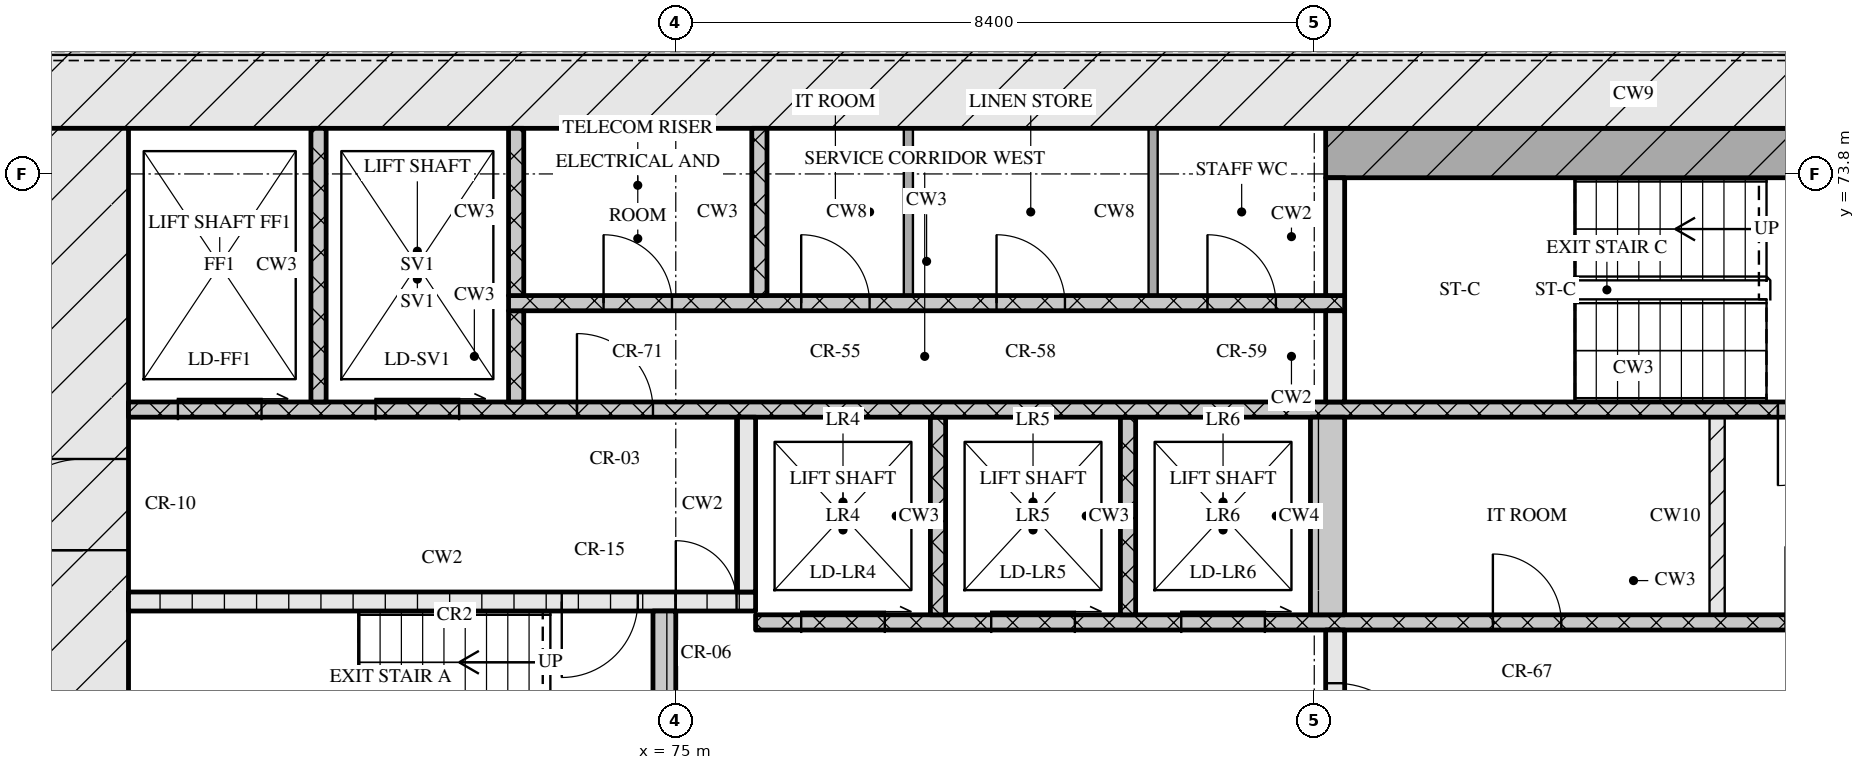
"""IFC4 building model, lengths in metres.
Left out: names, types, materials, properties, quantities, classifications, styles, units other than length and angle.
Written with IfcOpenShell. Run it as: python <this file> out.ifc"""

import sys

from ifc_helpers import new_model, si_unit, direction, frame, frame_2d, origin, place, context, subcontext, project, spatial, rectangle, extrude, element, fill, save


model = new_model("IFC4")
c1 = context("Model", 3, precision=1e-05, world=origin(), true_north=direction((0.0, 1.0)))
c2 = subcontext(c1, "Body", "Model", "MODEL_VIEW")
j1 = project(units=[si_unit("LENGTHUNIT", "METRE"), si_unit("PLANEANGLEUNIT", "RADIAN")], contexts=[c1])
p1 = place(None, origin())
s1 = spatial("IfcSite", under=j1, at=p1, CompositionType="ELEMENT")
p2 = place(p1, origin())
s2 = spatial("IfcBuilding", under=s1, at=p2, CompositionType="ELEMENT")
p3 = place(p2, frame((0.0, 0.0, 80.4)))
s3 = spatial("IfcBuildingStorey", under=s2, at=p3, CompositionType="ELEMENT", Elevation=80.4)
p4 = place(p3, frame((66.6, 75.0, 0.0), z_axis=(0.0, 0.0, 1.0), x_axis=(1.0, 0.0, 0.0)))
e1 = element("IfcWall", 1, at=p4, inside=s3, PredefinedType="SOLIDWALL", context=c2, shape_type="SweptSolid", body=[
    extrude(rectangle(XDim=42.0, YDim=1.2, at=frame_2d((21.0, 0.0))), origin(), (0.0, 0.0, 1.0), 3.3),
])
p5 = place(p3, frame((67.2, 62.4, 0.0), z_axis=(0.0, 0.0, 1.0), x_axis=(0.0, 1.0, 0.0)))
e2 = element("IfcWall", 2, at=p5, inside=s3, PredefinedType="SOLIDWALL", context=c2, shape_type="SweptSolid", body=[
    extrude(rectangle(XDim=12.0, YDim=1.2, at=frame_2d((6.0, 0.0))), origin(), (0.0, 0.0, 1.0), 3.3),
])
p6 = place(p5, frame((6.45, 0.0, 0.0)))
e3 = element("IfcOpeningElement", 3, at=p6, cuts=e2, PredefinedType="OPENING", context=c2, shape_type="SweptSolid", body=[
    extrude(rectangle(XDim=1.2, YDim=2.1, at=frame_2d((0.6, 1.05))), frame((0.0, 0.61, 0.0), z_axis=(0.0, -1.0, 0.0), x_axis=(1.0, 0.0, 0.0)), (0.0, 0.0, 1.0), 1.22),
])
p7 = place(p3, frame((74.85, 65.2, 0.0), z_axis=(0.0, 0.0, 1.0), x_axis=(0.0, 1.0, 0.0)))
e4 = element("IfcWall", 4, at=p7, inside=s3, PredefinedType="SOLIDWALL", context=c2, shape_type="SweptSolid", body=[
    extrude(rectangle(XDim=2.85, YDim=0.3, at=frame_2d((1.425, 0.0))), origin(), (0.0, 0.0, 1.0), 3.3),
])
p8 = place(p3, frame((83.675, 65.2, 0.0), z_axis=(0.0, 0.0, 1.0), x_axis=(0.0, 1.0, 0.0)))
e5 = element("IfcWall", 5, at=p8, inside=s3, PredefinedType="SOLIDWALL", context=c2, shape_type="SweptSolid", body=[
    extrude(rectangle(XDim=2.6, YDim=0.25, at=frame_2d((1.3, 0.0))), origin(), (0.0, 0.0, 1.0), 3.3),
])
p9 = place(p8, frame((0.7, 0.0, 0.0)))
e6 = element("IfcOpeningElement", 6, at=p9, cuts=e5, PredefinedType="OPENING", context=c2, shape_type="SweptSolid", body=[
    extrude(rectangle(XDim=1.2, YDim=2.1, at=frame_2d((0.6, 1.05))), frame((0.0, 0.135, 0.0), z_axis=(0.0, -1.0, 0.0), x_axis=(1.0, 0.0, 0.0)), (0.0, 0.0, 1.0), 0.27),
])
p10 = place(p3, frame((76.05, 67.9, 0.0), z_axis=(0.0, 0.0, 1.0), x_axis=(1.0, 0.0, 0.0)))
e7 = element("IfcWall", 7, at=p10, inside=s3, PredefinedType="SOLIDWALL", context=c2, shape_type="SweptSolid", body=[
    extrude(rectangle(XDim=23.1, YDim=0.2, at=frame_2d((11.55, 0.0))), origin(), (0.0, 0.0, 1.0), 3.3),
])
p11 = place(p10, frame((0.6, 0.0, 0.0)))
e8 = element("IfcOpeningElement", 8, at=p11, cuts=e7, PredefinedType="OPENING", context=c2, shape_type="SweptSolid", body=[
    extrude(rectangle(XDim=1.1, YDim=2.1, at=frame_2d((0.55, 1.05))), frame((0.0, 0.11, 0.0), z_axis=(0.0, -1.0, 0.0), x_axis=(1.0, 0.0, 0.0)), (0.0, 0.0, 1.0), 0.22),
])
p12 = place(p10, frame((3.1, 0.0, 0.0)))
e9 = element("IfcOpeningElement", 9, at=p12, cuts=e7, PredefinedType="OPENING", context=c2, shape_type="SweptSolid", body=[
    extrude(rectangle(XDim=1.1, YDim=2.1, at=frame_2d((0.55, 1.05))), frame((0.0, 0.11, 0.0), z_axis=(0.0, -1.0, 0.0), x_axis=(1.0, 0.0, 0.0)), (0.0, 0.0, 1.0), 0.22),
])
p13 = place(p10, frame((5.6, 0.0, 0.0)))
e10 = element("IfcOpeningElement", 10, at=p13, cuts=e7, PredefinedType="OPENING", context=c2, shape_type="SweptSolid", body=[
    extrude(rectangle(XDim=1.1, YDim=2.1, at=frame_2d((0.55, 1.05))), frame((0.0, 0.11, 0.0), z_axis=(0.0, -1.0, 0.0), x_axis=(1.0, 0.0, 0.0)), (0.0, 0.0, 1.0), 0.22),
])
p14 = place(p10, frame((9.7, 0.0, 0.0)))
e11 = element("IfcOpeningElement", 11, at=p14, cuts=e7, PredefinedType="OPENING", context=c2, shape_type="SweptSolid", body=[
    extrude(rectangle(XDim=0.9, YDim=2.1, at=frame_2d((0.45, 1.05))), frame((0.0, 0.11, 0.0), z_axis=(0.0, -1.0, 0.0), x_axis=(1.0, 0.0, 0.0)), (0.0, 0.0, 1.0), 0.22),
])
p15 = place(p10, frame((13.55, 0.0, 0.0)))
e12 = element("IfcOpeningElement", 12, at=p15, cuts=e7, PredefinedType="OPENING", context=c2, shape_type="SweptSolid", body=[
    extrude(rectangle(XDim=1.0, YDim=2.1, at=frame_2d((0.5, 1.05))), frame((0.0, 0.11, 0.0), z_axis=(0.0, -1.0, 0.0), x_axis=(1.0, 0.0, 0.0)), (0.0, 0.0, 1.0), 0.22),
])
for number, where, z_axis, x_axis in (
    (13, (78.45, 68.0, 0.0), (0.0, 0.0, 1.0), (0.0, 1.0, 0.0)),
    (14, (80.95, 68.0, 0.0), (0.0, 0.0, 1.0), (0.0, 1.0, 0.0)),
):
    element("IfcWall", number, at=place(p3, frame(where, z_axis=z_axis, x_axis=x_axis)), inside=s3, PredefinedType="SOLIDWALL", context=c2, shape_type="SweptSolid", body=[
        extrude(rectangle(XDim=2.6, YDim=0.2, at=frame_2d((1.3, 0.0))), origin(), (0.0, 0.0, 1.0), 3.3),
    ])
p16 = place(p3, frame((83.575, 68.0, 0.0), z_axis=(0.0, 0.0, 1.0), x_axis=(0.0, 1.0, 0.0)))
e15 = element("IfcWall", 15, at=p16, inside=s3, PredefinedType="SOLIDWALL", context=c2, shape_type="SweptSolid", body=[
    extrude(rectangle(XDim=2.6, YDim=0.45, at=frame_2d((1.3, 0.0))), origin(), (0.0, 0.0, 1.0), 3.3),
])
p17 = place(p3, frame((88.7, 68.0, 0.0), z_axis=(0.0, 0.0, 1.0), x_axis=(0.0, 1.0, 0.0)))
e16 = element("IfcWall", 16, at=p17, inside=s3, PredefinedType="PARTITIONING", context=c2, shape_type="SweptSolid", body=[
    extrude(rectangle(XDim=2.6, YDim=0.2, at=frame_2d((1.3, 0.0))), origin(), (0.0, 0.0, 1.0), 3.3),
])
p18 = place(p3, frame((67.8, 68.175, 0.0), z_axis=(0.0, 0.0, 1.0), x_axis=(1.0, 0.0, 0.0)))
e17 = element("IfcWall", 17, at=p18, inside=s3, PredefinedType="SOLIDWALL", context=c2, shape_type="SweptSolid", body=[
    extrude(rectangle(XDim=8.25, YDim=0.25, at=frame_2d((4.125, 0.0))), origin(), (0.0, 0.0, 1.0), 3.3),
])
p19 = place(p18, frame((5.7, 0.0, 0.0)))
e18 = element("IfcOpeningElement", 18, at=p19, cuts=e17, PredefinedType="OPENING", context=c2, shape_type="SweptSolid", body=[
    extrude(rectangle(XDim=1.0, YDim=2.1, at=frame_2d((0.5, 1.05))), frame((0.0, 0.135, 0.0), z_axis=(0.0, -1.0, 0.0), x_axis=(1.0, 0.0, 0.0)), (0.0, 0.0, 1.0), 0.27),
])
p20 = place(p18, frame((7.2, 0.0, 0.0)))
e19 = element("IfcOpeningElement", 19, at=p20, cuts=e17, PredefinedType="OPENING", context=c2, shape_type="SweptSolid", body=[
    extrude(rectangle(XDim=0.8, YDim=2.1, at=frame_2d((0.4, 1.05))), frame((0.0, 0.135, 0.0), z_axis=(0.0, -1.0, 0.0), x_axis=(1.0, 0.0, 0.0)), (0.0, 0.0, 1.0), 0.27),
])
p21 = place(p3, frame((75.925, 68.3, 0.0), z_axis=(0.0, 0.0, 1.0), x_axis=(0.0, 1.0, 0.0)))
e20 = element("IfcWall", 20, at=p21, inside=s3, PredefinedType="SOLIDWALL", context=c2, shape_type="SweptSolid", body=[
    extrude(rectangle(XDim=2.3, YDim=0.25, at=frame_2d((1.15, 0.0))), origin(), (0.0, 0.0, 1.0), 3.3),
])
p22 = place(p3, frame((67.8, 70.7, 0.0), z_axis=(0.0, 0.0, 1.0), x_axis=(1.0, 0.0, 0.0)))
e21 = element("IfcWall", 21, at=p22, inside=s3, PredefinedType="SOLIDWALL", context=c2, shape_type="SweptSolid", body=[
    extrude(rectangle(XDim=39.6, YDim=0.2, at=frame_2d((19.8, 0.0))), origin(), (0.0, 0.0, 1.0), 3.3),
])
p23 = place(p22, frame((0.65, 0.0, 0.0)))
e22 = element("IfcOpeningElement", 22, at=p23, cuts=e21, PredefinedType="OPENING", context=c2, shape_type="SweptSolid", body=[
    extrude(rectangle(XDim=1.1, YDim=2.1, at=frame_2d((0.55, 1.05))), frame((0.0, 0.11, 0.0), z_axis=(0.0, -1.0, 0.0), x_axis=(1.0, 0.0, 0.0)), (0.0, 0.0, 1.0), 0.22),
])
p24 = place(p22, frame((3.25, 0.0, 0.0)))
e23 = element("IfcOpeningElement", 23, at=p24, cuts=e21, PredefinedType="OPENING", context=c2, shape_type="SweptSolid", body=[
    extrude(rectangle(XDim=1.1, YDim=2.1, at=frame_2d((0.55, 1.05))), frame((0.0, 0.11, 0.0), z_axis=(0.0, -1.0, 0.0), x_axis=(1.0, 0.0, 0.0)), (0.0, 0.0, 1.0), 0.22),
])
p25 = place(p22, frame((5.9, 0.0, 0.0)))
e24 = element("IfcOpeningElement", 24, at=p25, cuts=e21, PredefinedType="OPENING", context=c2, shape_type="SweptSolid", body=[
    extrude(rectangle(XDim=1.0, YDim=2.1, at=frame_2d((0.5, 1.05))), frame((0.0, 0.11, 0.0), z_axis=(0.0, -1.0, 0.0), x_axis=(1.0, 0.0, 0.0)), (0.0, 0.0, 1.0), 0.22),
])
p26 = place(p22, frame((21.7, 0.0, 0.0)))
e25 = element("IfcOpeningElement", 25, at=p26, cuts=e21, PredefinedType="OPENING", context=c2, shape_type="SweptSolid", body=[
    extrude(rectangle(XDim=1.0, YDim=2.1, at=frame_2d((0.5, 1.05))), frame((0.0, 0.11, 0.0), z_axis=(0.0, -1.0, 0.0), x_axis=(1.0, 0.0, 0.0)), (0.0, 0.0, 1.0), 0.22),
])
p27 = place(p22, frame((32.7, 0.0, 0.0)))
e26 = element("IfcOpeningElement", 26, at=p27, cuts=e21, PredefinedType="OPENING", context=c2, shape_type="SweptSolid", body=[
    extrude(rectangle(XDim=1.0, YDim=2.1, at=frame_2d((0.5, 1.05))), frame((0.0, 0.11, 0.0), z_axis=(0.0, -1.0, 0.0), x_axis=(1.0, 0.0, 0.0)), (0.0, 0.0, 1.0), 0.22),
])
p28 = place(p22, frame((35.25, 0.0, 0.0)))
e27 = element("IfcOpeningElement", 27, at=p28, cuts=e21, PredefinedType="OPENING", context=c2, shape_type="SweptSolid", body=[
    extrude(rectangle(XDim=1.1, YDim=2.1, at=frame_2d((0.55, 1.05))), frame((0.0, 0.11, 0.0), z_axis=(0.0, -1.0, 0.0), x_axis=(1.0, 0.0, 0.0)), (0.0, 0.0, 1.0), 0.22),
])
p29 = place(p22, frame((37.85, 0.0, 0.0)))
e28 = element("IfcOpeningElement", 28, at=p29, cuts=e21, PredefinedType="OPENING", context=c2, shape_type="SweptSolid", body=[
    extrude(rectangle(XDim=1.1, YDim=2.1, at=frame_2d((0.55, 1.05))), frame((0.0, 0.11, 0.0), z_axis=(0.0, -1.0, 0.0), x_axis=(1.0, 0.0, 0.0)), (0.0, 0.0, 1.0), 0.22),
])
p30 = place(p3, frame((70.3, 70.8, 0.0), z_axis=(0.0, 0.0, 1.0), x_axis=(0.0, 1.0, 0.0)))
e29 = element("IfcWall", 29, at=p30, inside=s3, PredefinedType="SOLIDWALL", context=c2, shape_type="SweptSolid", body=[
    extrude(rectangle(XDim=3.6, YDim=0.2, at=frame_2d((1.8, 0.0))), origin(), (0.0, 0.0, 1.0), 3.3),
])
p31 = place(p3, frame((72.9, 70.8, 0.0), z_axis=(0.0, 0.0, 1.0), x_axis=(0.0, 1.0, 0.0)))
e30 = element("IfcWall", 30, at=p31, inside=s3, PredefinedType="SOLIDWALL", context=c2, shape_type="SweptSolid", body=[
    extrude(rectangle(XDim=1.2, YDim=0.2, at=frame_2d((0.6, 0.0))), origin(), (0.0, 0.0, 1.0), 3.3),
])
p32 = place(p3, frame((83.675, 70.8, 0.0), z_axis=(0.0, 0.0, 1.0), x_axis=(0.0, 1.0, 0.0)))
e31 = element("IfcWall", 31, at=p32, inside=s3, PredefinedType="SOLIDWALL", context=c2, shape_type="SweptSolid", body=[
    extrude(rectangle(XDim=1.2, YDim=0.25, at=frame_2d((0.6, 0.0))), origin(), (0.0, 0.0, 1.0), 3.3),
])
p33 = place(p3, frame((72.8, 72.1, 0.0), z_axis=(0.0, 0.0, 1.0), x_axis=(1.0, 0.0, 0.0)))
e32 = element("IfcWall", 32, at=p33, inside=s3, PredefinedType="SOLIDWALL", context=c2, shape_type="SweptSolid", body=[
    extrude(rectangle(XDim=11.0, YDim=0.2, at=frame_2d((5.5, 0.0))), origin(), (0.0, 0.0, 1.0), 3.3),
])
p34 = place(p33, frame((1.25, 0.0, 0.0)))
e33 = element("IfcOpeningElement", 33, at=p34, cuts=e32, PredefinedType="OPENING", context=c2, shape_type="SweptSolid", body=[
    extrude(rectangle(XDim=0.9, YDim=2.1, at=frame_2d((0.45, 1.05))), frame((0.0, 0.11, 0.0), z_axis=(0.0, -1.0, 0.0), x_axis=(1.0, 0.0, 0.0)), (0.0, 0.0, 1.0), 0.22),
])
p35 = place(p33, frame((3.85, 0.0, 0.0)))
e34 = element("IfcOpeningElement", 34, at=p35, cuts=e32, PredefinedType="OPENING", context=c2, shape_type="SweptSolid", body=[
    extrude(rectangle(XDim=0.9, YDim=2.1, at=frame_2d((0.45, 1.05))), frame((0.0, 0.11, 0.0), z_axis=(0.0, -1.0, 0.0), x_axis=(1.0, 0.0, 0.0)), (0.0, 0.0, 1.0), 0.22),
])
p36 = place(p33, frame((6.42, 0.0, 0.0)))
e35 = element("IfcOpeningElement", 35, at=p36, cuts=e32, PredefinedType="OPENING", context=c2, shape_type="SweptSolid", body=[
    extrude(rectangle(XDim=0.9, YDim=2.1, at=frame_2d((0.45, 1.05))), frame((0.0, 0.11, 0.0), z_axis=(0.0, -1.0, 0.0), x_axis=(1.0, 0.0, 0.0)), (0.0, 0.0, 1.0), 0.22),
])
p37 = place(p33, frame((9.195, 0.0, 0.0)))
e36 = element("IfcOpeningElement", 36, at=p37, cuts=e32, PredefinedType="OPENING", context=c2, shape_type="SweptSolid", body=[
    extrude(rectangle(XDim=0.9, YDim=2.1, at=frame_2d((0.45, 1.05))), frame((0.0, 0.11, 0.0), z_axis=(0.0, -1.0, 0.0), x_axis=(1.0, 0.0, 0.0)), (0.0, 0.0, 1.0), 0.22),
])
for number, where, z_axis, x_axis in (
    (37, (72.9, 72.2, 0.0), (0.0, 0.0, 1.0), (0.0, 1.0, 0.0)),
    (38, (76.1, 72.2, 0.0), (0.0, 0.0, 1.0), (0.0, 1.0, 0.0)),
):
    element("IfcWall", number, at=place(p3, frame(where, z_axis=z_axis, x_axis=x_axis)), inside=s3, PredefinedType="SOLIDWALL", context=c2, shape_type="SweptSolid", body=[
        extrude(rectangle(XDim=2.2, YDim=0.2, at=frame_2d((1.1, 0.0))), origin(), (0.0, 0.0, 1.0), 3.3),
    ])
for number, where, z_axis, x_axis in (
    (39, (78.06, 72.2, 0.0), (0.0, 0.0, 1.0), (0.0, 1.0, 0.0)),
    (40, (81.28, 72.2, 0.0), (0.0, 0.0, 1.0), (0.0, 1.0, 0.0)),
):
    element("IfcWall", number, at=place(p3, frame(where, z_axis=z_axis, x_axis=x_axis)), inside=s3, PredefinedType="PARTITIONING", context=c2, shape_type="SweptSolid", body=[
        extrude(rectangle(XDim=2.2, YDim=0.12, at=frame_2d((1.1, 0.0))), origin(), (0.0, 0.0, 1.0), 3.3),
    ])
p38 = place(p3, frame((83.675, 72.2, 0.0), z_axis=(0.0, 0.0, 1.0), x_axis=(0.0, 1.0, 0.0)))
e41 = element("IfcWall", 41, at=p38, inside=s3, PredefinedType="SOLIDWALL", context=c2, shape_type="SweptSolid", body=[
    extrude(rectangle(XDim=1.55, YDim=0.25, at=frame_2d((0.775, 0.0))), origin(), (0.0, 0.0, 1.0), 3.3),
])
p39 = place(p3, frame((83.55, 74.075, 0.0), z_axis=(0.0, 0.0, 1.0), x_axis=(1.0, 0.0, 0.0)))
e42 = element("IfcWall", 42, at=p39, inside=s3, PredefinedType="SOLIDWALL", context=c2, shape_type="SweptSolid", body=[
    extrude(rectangle(XDim=8.1, YDim=0.65, at=frame_2d((4.05, 0.0))), origin(), (0.0, 0.0, 1.0), 3.3),
])
p40 = place(p9, origin())
e43 = element("IfcDoor", 43, at=p40, inside=s3, OperationType="SINGLE_SWING_RIGHT", PredefinedType="DOOR", context=c2, shape_type="SweptSolid", body=[
    extrude(rectangle(XDim=1.2, YDim=2.1, at=frame_2d((0.6, 1.05))), frame((0.0, 0.025, 0.0), z_axis=(0.0, -1.0, 0.0), x_axis=(1.0, 0.0, 0.0)), (0.0, 0.0, 1.0), 0.05),
])
fill(e6, e43)
p41 = place(p11, origin())
e44 = element("IfcDoor", 44, at=p41, inside=s3, OperationType="SLIDING_TO_RIGHT", PredefinedType="DOOR", context=c2, shape_type="SweptSolid", body=[
    extrude(rectangle(XDim=1.1, YDim=2.1, at=frame_2d((0.55, 1.05))), frame((0.0, 0.025, 0.0), z_axis=(0.0, -1.0, 0.0), x_axis=(1.0, 0.0, 0.0)), (0.0, 0.0, 1.0), 0.05),
])
fill(e8, e44)
p42 = place(p12, origin())
e45 = element("IfcDoor", 45, at=p42, inside=s3, OperationType="SLIDING_TO_RIGHT", PredefinedType="DOOR", context=c2, shape_type="SweptSolid", body=[
    extrude(rectangle(XDim=1.1, YDim=2.1, at=frame_2d((0.55, 1.05))), frame((0.0, 0.025, 0.0), z_axis=(0.0, -1.0, 0.0), x_axis=(1.0, 0.0, 0.0)), (0.0, 0.0, 1.0), 0.05),
])
fill(e9, e45)
p43 = place(p13, origin())
e46 = element("IfcDoor", 46, at=p43, inside=s3, OperationType="SLIDING_TO_RIGHT", PredefinedType="DOOR", context=c2, shape_type="SweptSolid", body=[
    extrude(rectangle(XDim=1.1, YDim=2.1, at=frame_2d((0.55, 1.05))), frame((0.0, 0.025, 0.0), z_axis=(0.0, -1.0, 0.0), x_axis=(1.0, 0.0, 0.0)), (0.0, 0.0, 1.0), 0.05),
])
fill(e10, e46)
p44 = place(p14, origin())
e47 = element("IfcDoor", 47, at=p44, inside=s3, OperationType="SINGLE_SWING_LEFT", PredefinedType="DOOR", context=c2, shape_type="SweptSolid", body=[
    extrude(rectangle(XDim=0.9, YDim=2.1, at=frame_2d((0.45, 1.05))), frame((0.0, 0.025, 0.0), z_axis=(0.0, -1.0, 0.0), x_axis=(1.0, 0.0, 0.0)), (0.0, 0.0, 1.0), 0.05),
])
fill(e11, e47)
p45 = place(p19, origin())
e48 = element("IfcDoor", 48, at=p45, inside=s3, OperationType="SINGLE_SWING_RIGHT", PredefinedType="DOOR", context=c2, shape_type="SweptSolid", body=[
    extrude(rectangle(XDim=1.0, YDim=2.1, at=frame_2d((0.5, 1.05))), frame((0.0, 0.025, 0.0), z_axis=(0.0, -1.0, 0.0), x_axis=(1.0, 0.0, 0.0)), (0.0, 0.0, 1.0), 0.05),
])
fill(e18, e48)
p46 = place(p20, origin())
e49 = element("IfcDoor", 49, at=p46, inside=s3, OperationType="SINGLE_SWING_LEFT", PredefinedType="DOOR", context=c2, shape_type="SweptSolid", body=[
    extrude(rectangle(XDim=0.8, YDim=2.1, at=frame_2d((0.4, 1.05))), frame((0.0, 0.025, 0.0), z_axis=(0.0, -1.0, 0.0), x_axis=(1.0, 0.0, 0.0)), (0.0, 0.0, 1.0), 0.05),
])
fill(e19, e49)
p47 = place(p6, origin())
e50 = element("IfcDoor", 50, at=p47, inside=s3, OperationType="SINGLE_SWING_LEFT", PredefinedType="DOOR", context=c2, shape_type="SweptSolid", body=[
    extrude(rectangle(XDim=1.2, YDim=2.1, at=frame_2d((0.6, 1.05))), frame((0.0, 0.025, 0.0), z_axis=(0.0, -1.0, 0.0), x_axis=(1.0, 0.0, 0.0)), (0.0, 0.0, 1.0), 0.05),
])
fill(e3, e50)
p48 = place(p23, origin())
e51 = element("IfcDoor", 51, at=p48, inside=s3, OperationType="SLIDING_TO_RIGHT", PredefinedType="DOOR", context=c2, shape_type="SweptSolid", body=[
    extrude(rectangle(XDim=1.1, YDim=2.1, at=frame_2d((0.55, 1.05))), frame((0.0, 0.025, 0.0), z_axis=(0.0, -1.0, 0.0), x_axis=(1.0, 0.0, 0.0)), (0.0, 0.0, 1.0), 0.05),
])
fill(e22, e51)
p49 = place(p24, origin())
e52 = element("IfcDoor", 52, at=p49, inside=s3, OperationType="SLIDING_TO_RIGHT", PredefinedType="DOOR", context=c2, shape_type="SweptSolid", body=[
    extrude(rectangle(XDim=1.1, YDim=2.1, at=frame_2d((0.55, 1.05))), frame((0.0, 0.025, 0.0), z_axis=(0.0, -1.0, 0.0), x_axis=(1.0, 0.0, 0.0)), (0.0, 0.0, 1.0), 0.05),
])
fill(e23, e52)
p50 = place(p25, origin())
e53 = element("IfcDoor", 53, at=p50, inside=s3, OperationType="SINGLE_SWING_LEFT", PredefinedType="DOOR", context=c2, shape_type="SweptSolid", body=[
    extrude(rectangle(XDim=1.0, YDim=2.1, at=frame_2d((0.5, 1.05))), frame((0.0, 0.025, 0.0), z_axis=(0.0, -1.0, 0.0), x_axis=(1.0, 0.0, 0.0)), (0.0, 0.0, 1.0), 0.05),
])
fill(e24, e53)
p51 = place(p26, origin())
e54 = element("IfcDoor", 54, at=p51, inside=s3, OperationType="SINGLE_SWING_RIGHT", PredefinedType="DOOR", context=c2, shape_type="SweptSolid", body=[
    extrude(rectangle(XDim=1.0, YDim=2.1, at=frame_2d((0.5, 1.05))), frame((0.0, 0.025, 0.0), z_axis=(0.0, -1.0, 0.0), x_axis=(1.0, 0.0, 0.0)), (0.0, 0.0, 1.0), 0.05),
])
fill(e25, e54)
p52 = place(p34, origin())
e55 = element("IfcDoor", 55, at=p52, inside=s3, OperationType="SINGLE_SWING_LEFT", PredefinedType="DOOR", context=c2, shape_type="SweptSolid", body=[
    extrude(rectangle(XDim=0.9, YDim=2.1, at=frame_2d((0.45, 1.05))), frame((0.0, 0.025, 0.0), z_axis=(0.0, -1.0, 0.0), x_axis=(1.0, 0.0, 0.0)), (0.0, 0.0, 1.0), 0.05),
])
fill(e33, e55)
p53 = place(p35, origin())
e56 = element("IfcDoor", 56, at=p53, inside=s3, OperationType="SINGLE_SWING_LEFT", PredefinedType="DOOR", context=c2, shape_type="SweptSolid", body=[
    extrude(rectangle(XDim=0.9, YDim=2.1, at=frame_2d((0.45, 1.05))), frame((0.0, 0.025, 0.0), z_axis=(0.0, -1.0, 0.0), x_axis=(1.0, 0.0, 0.0)), (0.0, 0.0, 1.0), 0.05),
])
fill(e34, e56)
p54 = place(p36, origin())
e57 = element("IfcDoor", 57, at=p54, inside=s3, OperationType="SINGLE_SWING_LEFT", PredefinedType="DOOR", context=c2, shape_type="SweptSolid", body=[
    extrude(rectangle(XDim=0.9, YDim=2.1, at=frame_2d((0.45, 1.05))), frame((0.0, 0.025, 0.0), z_axis=(0.0, -1.0, 0.0), x_axis=(1.0, 0.0, 0.0)), (0.0, 0.0, 1.0), 0.05),
])
fill(e35, e57)
p55 = place(p37, origin())
e58 = element("IfcDoor", 58, at=p55, inside=s3, OperationType="SINGLE_SWING_LEFT", PredefinedType="DOOR", context=c2, shape_type="SweptSolid", body=[
    extrude(rectangle(XDim=0.9, YDim=2.1, at=frame_2d((0.45, 1.05))), frame((0.0, 0.025, 0.0), z_axis=(0.0, -1.0, 0.0), x_axis=(1.0, 0.0, 0.0)), (0.0, 0.0, 1.0), 0.05),
])
fill(e36, e58)
save(model, sys.argv[1])
